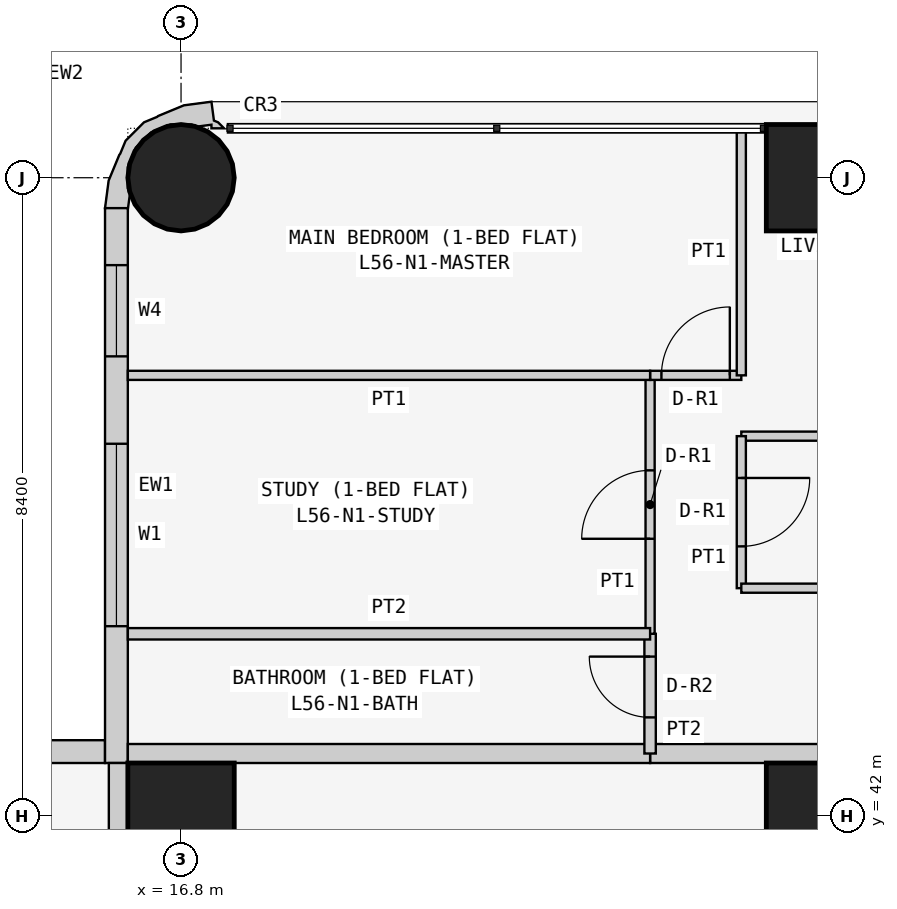
"""IFC4 building model, lengths in metres.
Left out: names, types, materials, properties, quantities, classifications, styles, units other than length and angle.
Written with IfcOpenShell. Run it as: python <this file> out.ifc"""

import sys

from ifc_helpers import new_model, si_unit, direction, frame, frame_2d, origin, origin_2d, place, context, subcontext, project, spatial, polyline, rectangle, circle, outline, extrude, element, fill, save


model = new_model("IFC4")
c1 = context("Model", 3, precision=1e-05, world=origin(), true_north=direction((0.0, 1.0)))
c2 = subcontext(c1, "Body", "Model", "MODEL_VIEW")
j1 = project(units=[si_unit("LENGTHUNIT", "METRE"), si_unit("PLANEANGLEUNIT", "RADIAN")], contexts=[c1])
p1 = place(None, origin())
s1 = spatial("IfcSite", under=j1, at=p1, CompositionType="ELEMENT")
p2 = place(p1, origin())
s2 = spatial("IfcBuilding", under=s1, at=p2, CompositionType="ELEMENT")
p3 = place(p2, frame((0.0, 0.0, 215.7)))
s3 = spatial("IfcBuildingStorey", under=s2, at=p3, CompositionType="ELEMENT", Elevation=215.7)
p4 = place(p3, frame((16.8, 42.0, 0.0), z_axis=(0.0, 0.0, 1.0), x_axis=(1.0, 0.0, 0.0)))
e1 = element("IfcColumn", 1, at=p4, inside=s3, PredefinedType="COLUMN", context=c2, shape_type="SweptSolid", body=[
    extrude(rectangle(XDim=1.4, YDim=1.4, at=origin_2d()), origin(), (0.0, 0.0, 1.0), 3.6),
])
p5 = place(p3, frame((16.8, 50.4, 0.0), z_axis=(0.0, 0.0, 1.0), x_axis=(1.0, 0.0, 0.0)))
e2 = element("IfcColumn", 2, at=p5, inside=s3, PredefinedType="COLUMN", context=c2, shape_type="SweptSolid", body=[
    extrude(circle(Radius=0.7, at=origin_2d()), origin(), (0.0, 0.0, 1.0), 3.6),
])
for number, where, z_axis, x_axis in (
    (3, (25.2, 42.0, 0.0), (0.0, 0.0, 1.0), (1.0, 0.0, 0.0)),
    (4, (25.2, 50.4, 0.0), (0.0, 0.0, 1.0), (1.0, 0.0, 0.0)),
):
    element("IfcColumn", number, at=place(p3, frame(where, z_axis=z_axis, x_axis=x_axis)), inside=s3, PredefinedType="COLUMN", context=c2, shape_type="SweptSolid", body=[
        extrude(rectangle(XDim=1.4, YDim=1.4, at=origin_2d()), origin(), (0.0, 0.0, 1.0), 3.6),
    ])
p6 = place(p3, frame((15.8, 42.85, 0.0), z_axis=(0.0, 0.0, 1.0), x_axis=(-1.0, 0.0, 0.0)))
e5 = element("IfcWall", 5, at=p6, inside=s3, PredefinedType="SOLIDWALL", context=c2, shape_type="SweptSolid", body=[
    extrude(rectangle(XDim=15.4, YDim=0.3, at=frame_2d((7.7, 0.0))), origin(), (0.0, 0.0, 1.0), 3.45),
])
p7 = place(p6, frame((1.2, 0.0, 0.9)))
e6 = element("IfcOpeningElement", 6, at=p7, cuts=e5, PredefinedType="OPENING", context=c2, shape_type="SweptSolid", body=[
    extrude(rectangle(XDim=1.8, YDim=1.5, at=frame_2d((0.9, 0.75))), frame((0.0, 0.16, 0.0), z_axis=(0.0, -1.0, 0.0), x_axis=(1.0, 0.0, 0.0)), (0.0, 0.0, 1.0), 0.32),
])
p8 = place(p6, frame((4.95, 0.0, 1.5)))
e7 = element("IfcOpeningElement", 7, at=p8, cuts=e5, PredefinedType="OPENING", context=c2, shape_type="SweptSolid", body=[
    extrude(rectangle(XDim=0.9, YDim=0.7, at=frame_2d((0.45, 0.35))), frame((0.0, 0.16, 0.0), z_axis=(0.0, -1.0, 0.0), x_axis=(1.0, 0.0, 0.0)), (0.0, 0.0, 1.0), 0.32),
])
p9 = place(p6, frame((8.5, 0.0, 0.9)))
e8 = element("IfcOpeningElement", 8, at=p9, cuts=e5, PredefinedType="OPENING", context=c2, shape_type="SweptSolid", body=[
    extrude(rectangle(XDim=1.8, YDim=1.5, at=frame_2d((0.9, 0.75))), frame((0.0, 0.16, 0.0), z_axis=(0.0, -1.0, 0.0), x_axis=(1.0, 0.0, 0.0)), (0.0, 0.0, 1.0), 0.32),
])
p10 = place(p6, frame((12.5, 0.0, 0.0)))
e9 = element("IfcOpeningElement", 9, at=p10, cuts=e5, PredefinedType="OPENING", context=c2, shape_type="SweptSolid", body=[
    extrude(rectangle(XDim=0.9, YDim=2.4, at=frame_2d((0.45, 1.2))), frame((0.0, 0.16, 0.0), z_axis=(0.0, -1.0, 0.0), x_axis=(1.0, 0.0, 0.0)), (0.0, 0.0, 1.0), 0.32),
])
p11 = place(p6, frame((13.5, 0.0, 0.9)))
e10 = element("IfcOpeningElement", 10, at=p11, cuts=e5, PredefinedType="OPENING", context=c2, shape_type="SweptSolid", body=[
    extrude(rectangle(XDim=1.2, YDim=1.5, at=frame_2d((0.6, 0.75))), frame((0.0, 0.16, 0.0), z_axis=(0.0, -1.0, 0.0), x_axis=(1.0, 0.0, 0.0)), (0.0, 0.0, 1.0), 0.32),
])
p12 = place(p3, frame((15.95, 50.0, 0.0), z_axis=(0.0, 0.0, 1.0), x_axis=(0.0, -1.0, 0.0)))
e11 = element("IfcWall", 11, at=p12, inside=s3, PredefinedType="SOLIDWALL", context=c2, shape_type="SweptSolid", body=[
    extrude(rectangle(XDim=7.3, YDim=0.3, at=frame_2d((3.65, 0.0))), origin(), (0.0, 0.0, 1.0), 3.45),
])
p13 = place(p12, frame((3.1, 0.0, 0.9)))
e12 = element("IfcOpeningElement", 12, at=p13, cuts=e11, PredefinedType="OPENING", context=c2, shape_type="SweptSolid", body=[
    extrude(rectangle(XDim=2.4, YDim=1.5, at=frame_2d((1.2, 0.75))), frame((0.0, 0.16, 0.0), z_axis=(0.0, -1.0, 0.0), x_axis=(1.0, 0.0, 0.0)), (0.0, 0.0, 1.0), 0.32),
])
p14 = place(p12, frame((0.75, 0.0, 0.9)))
e13 = element("IfcOpeningElement", 13, at=p14, cuts=e11, PredefinedType="OPENING", context=c2, shape_type="SweptSolid", body=[
    extrude(rectangle(XDim=1.2, YDim=1.5, at=frame_2d((0.6, 0.75))), frame((0.0, 0.16, 0.0), z_axis=(0.0, -1.0, 0.0), x_axis=(1.0, 0.0, 0.0)), (0.0, 0.0, 1.0), 0.32),
])
p15 = place(p3, frame((17.312, 50.988, 0.0), z_axis=(0.0, 0.0, 1.0), x_axis=(-0.439933741929, 0.898030234854, 0.0)))
e14 = element("IfcWall", 14, at=p15, inside=s3, PredefinedType="SOLIDWALL", context=c2, shape_type="SweptSolid", body=[
    extrude(outline(polyline([(0.138, -0.039), (0.182, -0.0), (0.419, -0.08), (0.536, 0.266), (0.559, 0.631), (0.555, 0.651), (0.566, 0.836), (0.456, 1.159), (0.333, 1.298), (0.324, 1.316), (0.082, 1.591), (-0.222, 1.793), (-0.39, 1.541), (-0.372, 1.532), (-0.195, 1.414), (-0.12, 1.41), (0.131, 1.287), (0.315, 1.078), (0.406, 0.814), (0.388, 0.536), (0.265, 0.285), (0.209, 0.236), (0.148, 0.053), (0.105, 0.074), (0.032, -0.076), (0.138, -0.039)])), origin(), (0.0, 0.0, 1.0), 3.45),
])
p16 = place(p3, frame((22.971, 42.825, 0.0), z_axis=(0.0, 0.0, 1.0), x_axis=(1.0, 0.0, 0.0)))
e15 = element("IfcWall", 15, at=p16, inside=s3, PredefinedType="PARTITIONING", context=c2, shape_type="SweptSolid", body=[
    extrude(rectangle(XDim=6.429, YDim=0.25, at=frame_2d((3.214, 0.0))), origin(), (0.0, 0.0, 1.0), 3.45),
])
p17 = place(p16, frame((4.929, 0.0, 0.0)))
e16 = element("IfcOpeningElement", 16, at=p17, cuts=e15, PredefinedType="OPENING", context=c2, shape_type="SweptSolid", body=[
    extrude(rectangle(XDim=1.0, YDim=2.1, at=frame_2d((0.5, 1.05))), frame((0.0, 0.135, 0.0), z_axis=(0.0, -1.0, 0.0), x_axis=(1.0, 0.0, 0.0)), (0.0, 0.0, 1.0), 0.27),
])
p18 = place(p3, frame((16.1, 42.825, 0.0), z_axis=(0.0, 0.0, 1.0), x_axis=(1.0, 0.0, 0.0)))
e17 = element("IfcWall", 17, at=p18, inside=s3, PredefinedType="PARTITIONING", context=c2, shape_type="SweptSolid", body=[
    extrude(rectangle(XDim=6.871, YDim=0.25, at=frame_2d((3.436, 0.0))), origin(), (0.0, 0.0, 1.0), 3.45),
])
p19 = place(p3, frame((15.975, 36.229, 0.0), z_axis=(0.0, 0.0, 1.0), x_axis=(0.0, 1.0, 0.0)))
e18 = element("IfcWall", 18, at=p19, inside=s3, PredefinedType="PARTITIONING", context=c2, shape_type="SweptSolid", body=[
    extrude(rectangle(XDim=6.471, YDim=0.25, at=frame_2d((3.235, 0.0))), origin(), (0.0, 0.0, 1.0), 3.45),
])
p20 = place(p3, frame((29.4, 47.0, 0.0), z_axis=(0.0, 0.0, 1.0), x_axis=(-1.0, 0.0, 0.0)))
e19 = element("IfcWall", 19, at=p20, inside=s3, PredefinedType="PARTITIONING", context=c2, shape_type="SweptSolid", body=[
    extrude(rectangle(XDim=5.229, YDim=0.12, at=frame_2d((2.615, 0.0))), origin(), (0.0, 0.0, 1.0), 3.45),
])
p21 = place(p3, frame((24.171, 47.0, 0.0), z_axis=(0.0, 0.0, 1.0), x_axis=(0.0, -1.0, 0.0)))
e20 = element("IfcWall", 20, at=p21, inside=s3, PredefinedType="PARTITIONING", context=c2, shape_type="SweptSolid", body=[
    extrude(rectangle(XDim=2.0, YDim=0.12, at=frame_2d((1.0, 0.0))), origin(), (0.0, 0.0, 1.0), 3.45),
])
p22 = place(p21, frame((0.55, 0.0, 0.0)))
e21 = element("IfcOpeningElement", 21, at=p22, cuts=e20, PredefinedType="OPENING", context=c2, shape_type="SweptSolid", body=[
    extrude(rectangle(XDim=0.9, YDim=2.1, at=frame_2d((0.45, 1.05))), frame((0.0, 0.07, 0.0), z_axis=(0.0, -1.0, 0.0), x_axis=(1.0, 0.0, 0.0)), (0.0, 0.0, 1.0), 0.14),
])
p23 = place(p3, frame((24.171, 45.0, 0.0), z_axis=(0.0, 0.0, 1.0), x_axis=(1.0, 0.0, 0.0)))
e22 = element("IfcWall", 22, at=p23, inside=s3, PredefinedType="PARTITIONING", context=c2, shape_type="SweptSolid", body=[
    extrude(rectangle(XDim=5.229, YDim=0.12, at=frame_2d((2.615, 0.0))), origin(), (0.0, 0.0, 1.0), 3.45),
])
p24 = place(p3, frame((22.971, 42.825, 0.0), z_axis=(0.0, 0.0, 1.0), x_axis=(0.0, 1.0, 0.0)))
e23 = element("IfcWall", 23, at=p24, inside=s3, PredefinedType="PARTITIONING", context=c2, shape_type="SweptSolid", body=[
    extrude(rectangle(XDim=1.575, YDim=0.15, at=frame_2d((0.788, 0.0))), origin(), (0.0, 0.0, 1.0), 3.45),
])
p25 = place(p24, frame((0.475, 0.0, 0.0)))
e24 = element("IfcOpeningElement", 24, at=p25, cuts=e23, PredefinedType="OPENING", context=c2, shape_type="SweptSolid", body=[
    extrude(rectangle(XDim=0.8, YDim=2.1, at=frame_2d((0.4, 1.05))), frame((0.0, 0.085, 0.0), z_axis=(0.0, -1.0, 0.0), x_axis=(1.0, 0.0, 0.0)), (0.0, 0.0, 1.0), 0.17),
])
p26 = place(p3, frame((22.971, 44.4, 0.0), z_axis=(0.0, 0.0, 1.0), x_axis=(0.0, 1.0, 0.0)))
e25 = element("IfcWall", 25, at=p26, inside=s3, PredefinedType="PARTITIONING", context=c2, shape_type="SweptSolid", body=[
    extrude(rectangle(XDim=3.4, YDim=0.12, at=frame_2d((1.7, 0.0))), origin(), (0.0, 0.0, 1.0), 3.45),
])
p27 = place(p26, frame((1.25, 0.0, 0.0)))
e26 = element("IfcOpeningElement", 26, at=p27, cuts=e25, PredefinedType="OPENING", context=c2, shape_type="SweptSolid", body=[
    extrude(rectangle(XDim=0.9, YDim=2.1, at=frame_2d((0.45, 1.05))), frame((0.0, 0.07, 0.0), z_axis=(0.0, -1.0, 0.0), x_axis=(1.0, 0.0, 0.0)), (0.0, 0.0, 1.0), 0.14),
])
p28 = place(p3, frame((22.971, 47.8, 0.0), z_axis=(0.0, 0.0, 1.0), x_axis=(1.0, 0.0, 0.0)))
e27 = element("IfcWall", 27, at=p28, inside=s3, PredefinedType="PARTITIONING", context=c2, shape_type="SweptSolid", body=[
    extrude(rectangle(XDim=1.2, YDim=0.12, at=frame_2d((0.6, 0.0))), origin(), (0.0, 0.0, 1.0), 3.45),
])
p29 = place(p28, frame((0.149, 0.0, 0.0)))
e28 = element("IfcOpeningElement", 28, at=p29, cuts=e27, PredefinedType="OPENING", context=c2, shape_type="SweptSolid", body=[
    extrude(rectangle(XDim=0.9, YDim=2.1, at=frame_2d((0.45, 1.05))), frame((0.0, 0.07, 0.0), z_axis=(0.0, -1.0, 0.0), x_axis=(1.0, 0.0, 0.0)), (0.0, 0.0, 1.0), 0.14),
])
p30 = place(p3, frame((24.171, 47.8, 0.0), z_axis=(0.0, 0.0, 1.0), x_axis=(0.0, 1.0, 0.0)))
e29 = element("IfcWall", 29, at=p30, inside=s3, PredefinedType="PARTITIONING", context=c2, shape_type="SweptSolid", body=[
    extrude(rectangle(XDim=3.25, YDim=0.12, at=frame_2d((1.625, 0.0))), origin(), (0.0, 0.0, 1.0), 3.45),
])
p31 = place(p3, frame((22.971, 44.4, 0.0), z_axis=(0.0, 0.0, 1.0), x_axis=(-1.0, 0.0, 0.0)))
e30 = element("IfcWall", 30, at=p31, inside=s3, PredefinedType="PARTITIONING", context=c2, shape_type="SweptSolid", body=[
    extrude(rectangle(XDim=6.871, YDim=0.15, at=frame_2d((3.436, 0.0))), origin(), (0.0, 0.0, 1.0), 3.45),
])
p32 = place(p3, frame((22.971, 47.8, 0.0), z_axis=(0.0, 0.0, 1.0), x_axis=(-1.0, 0.0, 0.0)))
e31 = element("IfcWall", 31, at=p32, inside=s3, PredefinedType="PARTITIONING", context=c2, shape_type="SweptSolid", body=[
    extrude(rectangle(XDim=6.871, YDim=0.12, at=frame_2d((3.436, 0.0))), origin(), (0.0, 0.0, 1.0), 3.45),
])
p33 = place(p13, origin())
e32 = element("IfcWindow", 32, at=p33, inside=s3, PartitioningType="SINGLE_PANEL", PredefinedType="WINDOW", context=c2, shape_type="SweptSolid", body=[
    extrude(rectangle(XDim=2.4, YDim=1.5, at=frame_2d((1.2, 0.75))), frame((0.0, 0.03, 0.0), z_axis=(0.0, -1.0, 0.0), x_axis=(1.0, 0.0, 0.0)), (0.0, 0.0, 1.0), 0.06),
])
fill(e12, e32)
p34 = place(p14, origin())
e33 = element("IfcWindow", 33, at=p34, inside=s3, PartitioningType="SINGLE_PANEL", PredefinedType="WINDOW", context=c2, shape_type="SweptSolid", body=[
    extrude(rectangle(XDim=1.2, YDim=1.5, at=frame_2d((0.6, 0.75))), frame((0.0, 0.03, 0.0), z_axis=(0.0, -1.0, 0.0), x_axis=(1.0, 0.0, 0.0)), (0.0, 0.0, 1.0), 0.06),
])
fill(e13, e33)
p35 = place(p22, origin())
e34 = element("IfcDoor", 34, at=p35, inside=s3, OperationType="SINGLE_SWING_LEFT", PredefinedType="DOOR", context=c2, shape_type="SweptSolid", body=[
    extrude(rectangle(XDim=0.9, YDim=2.1, at=frame_2d((0.45, 1.05))), frame((0.0, 0.025, 0.0), z_axis=(0.0, -1.0, 0.0), x_axis=(1.0, 0.0, 0.0)), (0.0, 0.0, 1.0), 0.05),
])
fill(e21, e34)
p36 = place(p25, origin())
e35 = element("IfcDoor", 35, at=p36, inside=s3, OperationType="SINGLE_SWING_RIGHT", PredefinedType="DOOR", context=c2, shape_type="SweptSolid", body=[
    extrude(rectangle(XDim=0.8, YDim=2.1, at=frame_2d((0.4, 1.05))), frame((0.0, 0.025, 0.0), z_axis=(0.0, -1.0, 0.0), x_axis=(1.0, 0.0, 0.0)), (0.0, 0.0, 1.0), 0.05),
])
fill(e24, e35)
p37 = place(p27, origin())
e36 = element("IfcDoor", 36, at=p37, inside=s3, OperationType="SINGLE_SWING_LEFT", PredefinedType="DOOR", context=c2, shape_type="SweptSolid", body=[
    extrude(rectangle(XDim=0.9, YDim=2.1, at=frame_2d((0.45, 1.05))), frame((0.0, 0.025, 0.0), z_axis=(0.0, -1.0, 0.0), x_axis=(1.0, 0.0, 0.0)), (0.0, 0.0, 1.0), 0.05),
])
fill(e26, e36)
p38 = place(p29, origin())
e37 = element("IfcDoor", 37, at=p38, inside=s3, OperationType="SINGLE_SWING_RIGHT", PredefinedType="DOOR", context=c2, shape_type="SweptSolid", body=[
    extrude(rectangle(XDim=0.9, YDim=2.1, at=frame_2d((0.45, 1.05))), frame((0.0, 0.025, 0.0), z_axis=(0.0, -1.0, 0.0), x_axis=(1.0, 0.0, 0.0)), (0.0, 0.0, 1.0), 0.05),
])
fill(e28, e37)
save(model, sys.argv[1])
